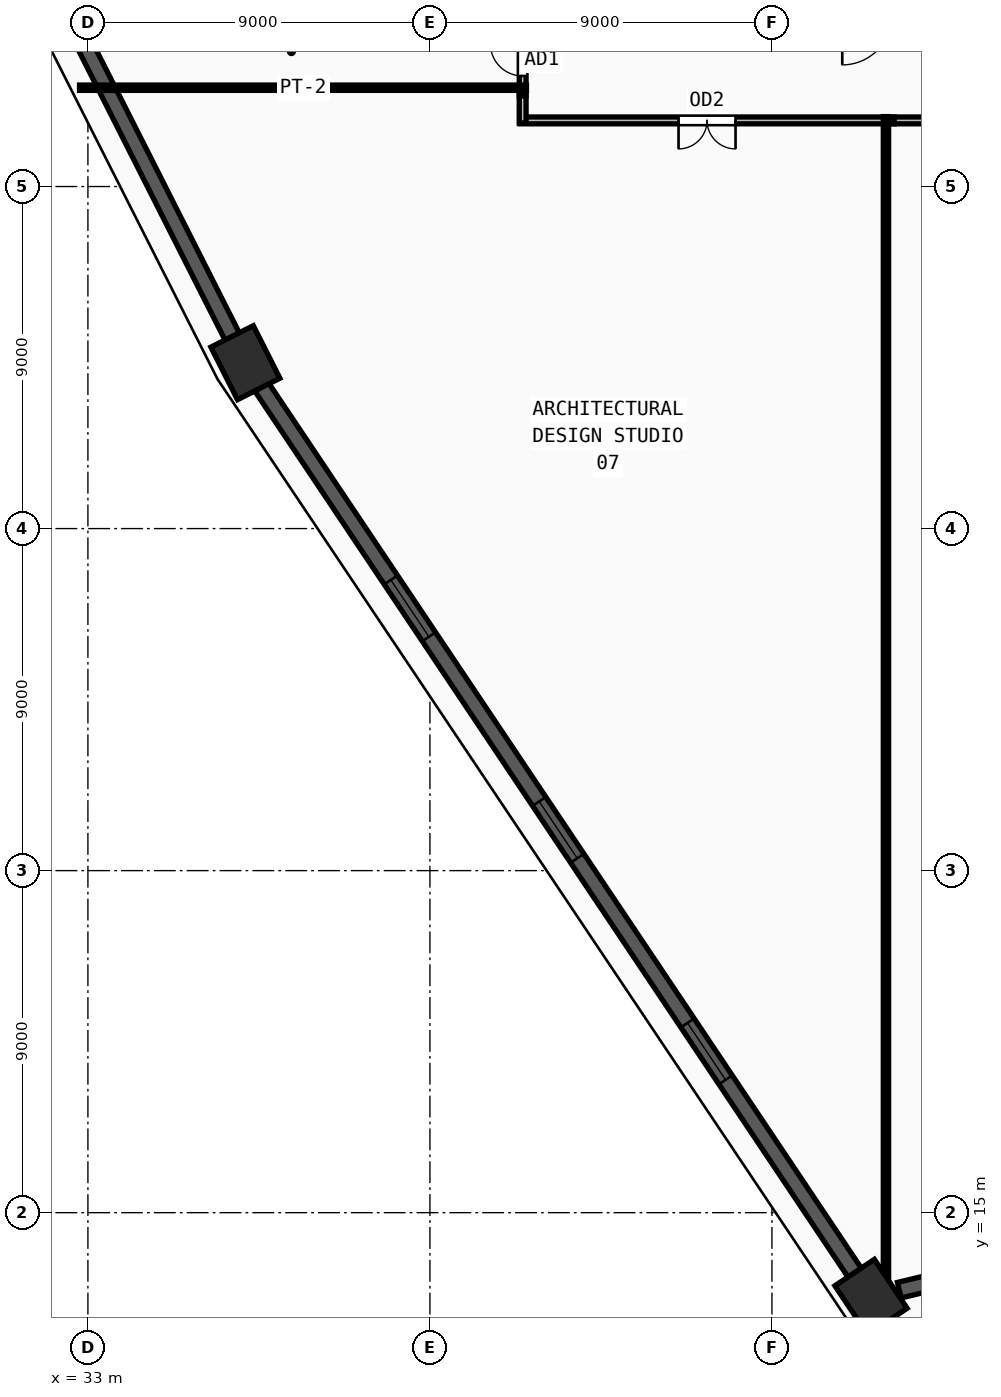
"""IFC4 building model, lengths in metres.
Left out: names, types, materials, properties, quantities, classifications, styles, units other than length and angle.
Written with IfcOpenShell. Run it as: python <this file> out.ifc"""

import sys

from ifc_helpers import new_model, si_unit, direction, frame, frame_2d, origin, origin_2d, place, context, subcontext, project, spatial, rectangle, extrude, source, transform, mapped, element, fill, save


model = new_model("IFC4")
c1 = context("Model", 3, precision=1e-05, world=origin(), true_north=direction((0.0, 1.0)))
c2 = subcontext(c1, "Body", "Model", "MODEL_VIEW")
j1 = project(units=[si_unit("LENGTHUNIT", "METRE"), si_unit("PLANEANGLEUNIT", "RADIAN")], contexts=[c1])
p1 = place(None, origin())
s1 = spatial("IfcSite", under=j1, at=p1, CompositionType="ELEMENT")
p2 = place(p1, origin())
s2 = spatial("IfcBuilding", under=s1, at=p2, CompositionType="ELEMENT")
p3 = place(p2, frame((0.0, 0.0, 39.75)))
s3 = spatial("IfcBuildingStorey", under=s2, at=p3, CompositionType="ELEMENT", Elevation=39.75)
m1 = source(origin(), c2, "Body", "SweptSolid", [
    extrude(rectangle(XDim=1.55, YDim=1.25, at=origin_2d()), origin(), (0.0, 0.0, 1.0), 3.75),
])
for number, where, z_axis, x_axis in (
    (1, (53.607, 12.78, 0.0), (0.0, 0.0, 1.0), (-0.556, 0.831, 0.0)),
    (2, (37.144, 37.365, 0.0), (0.0, 0.0, 1.0), (-0.451, 0.892, 0.0)),
):
    element("IfcColumn", number, at=place(p3, frame(where, z_axis=z_axis, x_axis=x_axis)), inside=s3, PredefinedType="COLUMN", context=c2, shape_type="MappedRepresentation", body=[
        mapped(m1, transform((0.0, 0.0, 0.0), x_axis=(1.0, 0.0, 0.0), y_axis=(0.0, 1.0, 0.0), z_axis=(0.0, 0.0, 1.0), scale=1.0)),
    ])
p4 = place(p3, frame((21.456, 68.395, 0.0), z_axis=(0.0, 0.0, 1.0), x_axis=(0.451198099626, -0.892423820219, 0.0)))
e3 = element("IfcWall", 3, at=p4, inside=s3, PredefinedType="SOLIDWALL", context=c2, shape_type="SweptSolid", body=[
    extrude(rectangle(XDim=34.005, YDim=0.42, at=frame_2d((17.002, 0.0))), origin(), (0.0, 0.0, 1.0), 3.57),
])
m2 = source(origin(), c2, "Body", "SweptSolid", [
    extrude(rectangle(XDim=1.8, YDim=1.95, at=frame_2d((0.9, 0.975))), frame((0.0, 0.22, 0.0), z_axis=(0.0, -1.0, 0.0), x_axis=(1.0, 0.0, 0.0)), (0.0, 0.0, 1.0), 0.44),
])
p5 = place(p4, frame((7.601, 0.0, 0.55)))
e4 = element("IfcOpeningElement", 4, at=p5, cuts=e3, PredefinedType="OPENING", context=c2, shape_type="MappedRepresentation", body=[
    mapped(m2, transform((0.0, 0.0, 0.0), x_axis=(1.0, 0.0, 0.0), y_axis=(0.0, 1.0, 0.0), z_axis=(0.0, 0.0, 1.0), scale=1.0)),
])
p6 = place(p4, frame((16.103, 0.0, 0.55)))
e5 = element("IfcOpeningElement", 5, at=p6, cuts=e3, PredefinedType="OPENING", context=c2, shape_type="MappedRepresentation", body=[
    mapped(m2, transform((0.0, 0.0, 0.0), x_axis=(1.0, 0.0, 0.0), y_axis=(0.0, 1.0, 0.0), z_axis=(0.0, 0.0, 1.0), scale=1.0)),
])
p7 = place(p3, frame((37.57, 36.729, 0.0), z_axis=(0.0, 0.0, 1.0), x_axis=(0.556397860577, -0.830916013051, 0.0)))
e6 = element("IfcWall", 6, at=p7, inside=s3, PredefinedType="SOLIDWALL", context=c2, shape_type="SweptSolid", body=[
    extrude(rectangle(XDim=28.057, YDim=0.42, at=frame_2d((14.028, 0.0))), origin(), (0.0, 0.0, 1.0), 3.57),
])
p8 = place(p7, frame((6.114, 0.0, 0.55)))
e7 = element("IfcOpeningElement", 7, at=p8, cuts=e6, PredefinedType="OPENING", context=c2, shape_type="MappedRepresentation", body=[
    mapped(m2, transform((0.0, 0.0, 0.0), x_axis=(1.0, 0.0, 0.0), y_axis=(0.0, 1.0, 0.0), z_axis=(0.0, 0.0, 1.0), scale=1.0)),
])
p9 = place(p7, frame((13.129, 0.0, 0.55)))
e8 = element("IfcOpeningElement", 8, at=p9, cuts=e6, PredefinedType="OPENING", context=c2, shape_type="MappedRepresentation", body=[
    mapped(m2, transform((0.0, 0.0, 0.0), x_axis=(1.0, 0.0, 0.0), y_axis=(0.0, 1.0, 0.0), z_axis=(0.0, 0.0, 1.0), scale=1.0)),
])
p10 = place(p7, frame((20.143, 0.0, 0.55)))
e9 = element("IfcOpeningElement", 9, at=p10, cuts=e6, PredefinedType="OPENING", context=c2, shape_type="MappedRepresentation", body=[
    mapped(m2, transform((0.0, 0.0, 0.0), x_axis=(1.0, 0.0, 0.0), y_axis=(0.0, 1.0, 0.0), z_axis=(0.0, 0.0, 1.0), scale=1.0)),
])
p11 = place(p3, frame((54.351, 12.96, 0.0), z_axis=(0.0, 0.0, 1.0), x_axis=(0.972077261258, 0.234661028177, 0.0)))
e10 = element("IfcWall", 10, at=p11, inside=s3, PredefinedType="SOLIDWALL", context=c2, shape_type="SweptSolid", body=[
    extrude(rectangle(XDim=5.046, YDim=0.42, at=frame_2d((2.523, 0.0))), origin(), (0.0, 0.0, 1.0), 3.57),
])
m3 = source(origin(), c2, "Body", "SweptSolid", [
    extrude(rectangle(XDim=1.2, YDim=1.9, at=frame_2d((0.6, 0.95))), frame((0.0, 0.22, 0.0), z_axis=(0.0, -1.0, 0.0), x_axis=(1.0, 0.0, 0.0)), (0.0, 0.0, 1.0), 0.44),
])
p12 = place(p11, frame((1.923, 0.0, 0.55)))
e11 = element("IfcOpeningElement", 11, at=p12, cuts=e10, PredefinedType="OPENING", context=c2, shape_type="MappedRepresentation", body=[
    mapped(m3, transform((0.0, 0.0, 0.0), x_axis=(1.0, 0.0, 0.0), y_axis=(0.0, 1.0, 0.0), z_axis=(0.0, 0.0, 1.0), scale=1.0)),
])
p13 = place(p3, frame((44.44, 44.385, 0.0), z_axis=(0.0, 0.0, 1.0), x_axis=(0.0, 1.0, 0.0)))
e12 = element("IfcWall", 12, at=p13, inside=s3, PredefinedType="PARTITIONING", context=c2, shape_type="SweptSolid", body=[
    extrude(rectangle(XDim=1.9, YDim=0.18, at=frame_2d((0.95, 0.0))), origin(), (0.0, 0.0, 1.0), 3.57),
])
m4 = source(origin(), c2, "Body", "SweptSolid", [
    extrude(rectangle(XDim=0.85, YDim=2.1, at=frame_2d((0.425, 1.05))), frame((0.0, 0.1, 0.0), z_axis=(0.0, -1.0, 0.0), x_axis=(1.0, 0.0, 0.0)), (0.0, 0.0, 1.0), 0.2),
])
p14 = place(p13, frame((0.525, 0.0, 0.0)))
e13 = element("IfcOpeningElement", 13, at=p14, cuts=e12, PredefinedType="OPENING", context=c2, shape_type="MappedRepresentation", body=[
    mapped(m4, transform((0.0, 0.0, 0.0), x_axis=(1.0, 0.0, 0.0), y_axis=(0.0, 1.0, 0.0), z_axis=(0.0, 0.0, 1.0), scale=1.0)),
])
p15 = place(p3, frame((54.215, 43.74, 0.0), z_axis=(0.0, 0.0, 1.0), x_axis=(-1.0, 0.0, 0.0)))
e14 = element("IfcWall", 14, at=p15, inside=s3, PredefinedType="PARTITIONING", context=c2, shape_type="SweptSolid", body=[
    extrude(rectangle(XDim=9.845, YDim=0.18, at=frame_2d((4.922, 0.0))), origin(), (0.0, 0.0, 1.0), 3.57),
])
m5 = source(origin(), c2, "Body", "SweptSolid", [
    extrude(rectangle(XDim=1.5, YDim=2.2, at=frame_2d((0.75, 1.1))), frame((0.0, 0.1, 0.0), z_axis=(0.0, -1.0, 0.0), x_axis=(1.0, 0.0, 0.0)), (0.0, 0.0, 1.0), 0.2),
])
p16 = place(p15, frame((4.173, 0.0, 0.0)))
e15 = element("IfcOpeningElement", 15, at=p16, cuts=e14, PredefinedType="OPENING", context=c2, shape_type="MappedRepresentation", body=[
    mapped(m5, transform((0.0, 0.0, 0.0), x_axis=(1.0, 0.0, 0.0), y_axis=(0.0, 1.0, 0.0), z_axis=(0.0, 0.0, 1.0), scale=1.0)),
])
p17 = place(p3, frame((75.63, 43.74, 0.0), z_axis=(0.0, 0.0, 1.0), x_axis=(-1.0, 0.0, 0.0)))
e16 = element("IfcWall", 16, at=p17, inside=s3, PredefinedType="PARTITIONING", context=c2, shape_type="SweptSolid", body=[
    extrude(rectangle(XDim=21.415, YDim=0.18, at=frame_2d((10.708, 0.0))), origin(), (0.0, 0.0, 1.0), 3.57),
])
p18 = place(p17, frame((9.657, 0.0, 0.0)))
e17 = element("IfcOpeningElement", 17, at=p18, cuts=e16, PredefinedType="OPENING", context=c2, shape_type="MappedRepresentation", body=[
    mapped(m5, transform((0.0, 0.0, 0.0), x_axis=(1.0, 0.0, 0.0), y_axis=(0.0, 1.0, 0.0), z_axis=(0.0, 0.0, 1.0), scale=1.0)),
])
p19 = place(p3, frame((44.44, 43.67, 0.0), z_axis=(0.0, 0.0, 1.0), x_axis=(0.0, 1.0, 0.0)))
e18 = element("IfcWall", 18, at=p19, inside=s3, PredefinedType="PARTITIONING", context=c2, shape_type="SweptSolid", body=[
    extrude(rectangle(XDim=0.715, YDim=0.18, at=frame_2d((0.357, 0.0))), origin(), (0.0, 0.0, 1.0), 3.57),
])
p20 = place(p3, frame((44.54, 44.6, 0.0), z_axis=(0.0, 0.0, 1.0), x_axis=(-1.0, 0.0, 0.0)))
e19 = element("IfcWall", 19, at=p20, inside=s3, PredefinedType="PARTITIONING", context=c2, shape_type="SweptSolid", body=[
    extrude(rectangle(XDim=11.76, YDim=0.14, at=frame_2d((5.88, 0.0))), origin(), (0.0, 0.0, 1.0), 3.57),
])
p21 = place(p3, frame((54.0, 43.84, 0.0), z_axis=(0.0, 0.0, 1.0), x_axis=(0.0, -1.0, 0.0)))
e20 = element("IfcWall", 20, at=p21, inside=s3, PredefinedType="PARTITIONING", context=c2, shape_type="SweptSolid", body=[
    extrude(rectangle(XDim=31.613, YDim=0.14, at=frame_2d((15.807, 0.0))), origin(), (0.0, 0.0, 1.0), 3.57),
])
m6 = source(origin(), c2, "Body", "SweptSolid", [
    extrude(rectangle(XDim=1.8, YDim=1.95, at=frame_2d((0.9, 0.975))), frame((0.0, 0.03, 0.0), z_axis=(0.0, -1.0, 0.0), x_axis=(1.0, 0.0, 0.0)), (0.0, 0.0, 1.0), 0.06),
])
p22 = place(p8, origin())
e21 = element("IfcWindow", 21, at=p22, inside=s3, PartitioningType="DOUBLE_PANEL_VERTICAL", PredefinedType="WINDOW", context=c2, shape_type="MappedRepresentation", body=[
    mapped(m6, transform((0.0, 0.0, 0.0), x_axis=(1.0, 0.0, 0.0), y_axis=(0.0, 1.0, 0.0), z_axis=(0.0, 0.0, 1.0), scale=1.0)),
])
fill(e7, e21)
p23 = place(p9, origin())
e22 = element("IfcWindow", 22, at=p23, inside=s3, PartitioningType="DOUBLE_PANEL_VERTICAL", PredefinedType="WINDOW", context=c2, shape_type="MappedRepresentation", body=[
    mapped(m6, transform((0.0, 0.0, 0.0), x_axis=(1.0, 0.0, 0.0), y_axis=(0.0, 1.0, 0.0), z_axis=(0.0, 0.0, 1.0), scale=1.0)),
])
fill(e8, e22)
p24 = place(p10, origin())
e23 = element("IfcWindow", 23, at=p24, inside=s3, PartitioningType="DOUBLE_PANEL_VERTICAL", PredefinedType="WINDOW", context=c2, shape_type="MappedRepresentation", body=[
    mapped(m6, transform((0.0, 0.0, 0.0), x_axis=(1.0, 0.0, 0.0), y_axis=(0.0, 1.0, 0.0), z_axis=(0.0, 0.0, 1.0), scale=1.0)),
])
fill(e9, e23)
m7 = source(origin(), c2, "Body", "SweptSolid", [
    extrude(rectangle(XDim=0.85, YDim=2.1, at=frame_2d((0.425, 1.05))), frame((0.0, 0.025, 0.0), z_axis=(0.0, -1.0, 0.0), x_axis=(1.0, 0.0, 0.0)), (0.0, 0.0, 1.0), 0.05),
])
p25 = place(p14, origin())
e24 = element("IfcDoor", 24, at=p25, inside=s3, OperationType="SINGLE_SWING_RIGHT", PredefinedType="DOOR", context=c2, shape_type="MappedRepresentation", body=[
    mapped(m7, transform((0.0, 0.0, 0.0), x_axis=(1.0, 0.0, 0.0), y_axis=(0.0, 1.0, 0.0), z_axis=(0.0, 0.0, 1.0), scale=1.0)),
])
fill(e13, e24)
m8 = source(origin(), c2, "Body", "SweptSolid", [
    extrude(rectangle(XDim=1.5, YDim=2.2, at=frame_2d((0.75, 1.1))), frame((0.0, 0.025, 0.0), z_axis=(0.0, -1.0, 0.0), x_axis=(1.0, 0.0, 0.0)), (0.0, 0.0, 1.0), 0.05),
])
p26 = place(p16, origin())
e25 = element("IfcDoor", 25, at=p26, inside=s3, OperationType="DOUBLE_DOOR_SINGLE_SWING", PredefinedType="DOOR", context=c2, shape_type="MappedRepresentation", body=[
    mapped(m8, transform((0.0, 0.0, 0.0), x_axis=(1.0, 0.0, 0.0), y_axis=(0.0, 1.0, 0.0), z_axis=(0.0, 0.0, 1.0), scale=1.0)),
])
fill(e15, e25)
save(model, sys.argv[1])
